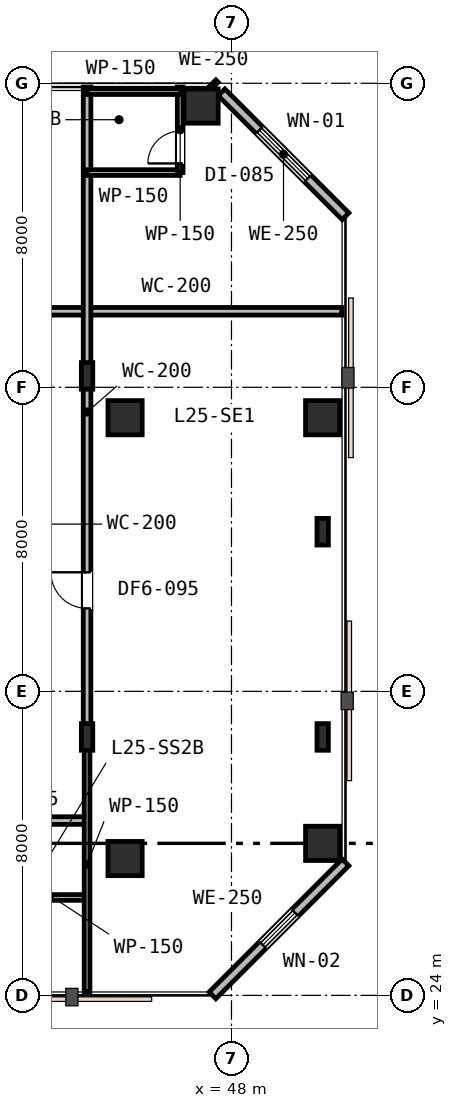
"""IFC4 building model, lengths in metres.
Left out: names, types, materials, properties, quantities, classifications, styles, units other than length and angle.
Written with IfcOpenShell. Run it as: python <this file> out.ifc"""

import sys

from ifc_helpers import new_model, si_unit, direction, frame, frame_2d, origin, origin_2d, place, context, subcontext, project, spatial, rectangle, i_section, extrude, element, fill, save


model = new_model("IFC4")
c1 = context("Model", 3, precision=1e-05, world=origin(), true_north=direction((0.0, 1.0)))
c2 = subcontext(c1, "Body", "Model", "MODEL_VIEW")
j1 = project(units=[si_unit("LENGTHUNIT", "METRE"), si_unit("PLANEANGLEUNIT", "RADIAN")], contexts=[c1])
p1 = place(None, origin())
s1 = spatial("IfcSite", under=j1, at=p1, CompositionType="ELEMENT")
p2 = place(p1, origin())
s2 = spatial("IfcBuilding", under=s1, at=p2, CompositionType="ELEMENT")
p3 = place(p2, frame((0.0, 0.0, 100.8)))
s3 = spatial("IfcBuildingStorey", under=s2, at=p3, CompositionType="ELEMENT", Elevation=100.8)
for number, where, z_axis, x_axis in (
    (1, (45.2, 27.6, 0.0), (0.0, 0.0, 1.0), (1.0, 0.0, 0.0)),
    (2, (45.2, 39.2, 0.0), (0.0, 0.0, 1.0), (1.0, 0.0, 0.0)),
    (3, (47.2, 47.4, 0.0), (0.0, 0.0, 1.0), (1.0, 0.0, 0.0)),
    (4, (50.4, 28.0, 0.0), (0.0, 0.0, 1.0), (1.0, 0.0, 0.0)),
    (5, (50.4, 39.2, 0.0), (0.0, 0.0, 1.0), (1.0, 0.0, 0.0)),
):
    element("IfcColumn", number, at=place(p3, frame(where, z_axis=z_axis, x_axis=x_axis)), inside=s3, PredefinedType="COLUMN", context=c2, shape_type="SweptSolid", body=[
        extrude(rectangle(XDim=0.9, YDim=0.9, at=origin_2d()), origin(), (0.0, 0.0, 1.0), 3.6),
    ])
for number, where, z_axis, x_axis in (
    (6, (44.2, 30.8, 0.0), (0.0, 0.0, 1.0), (1.0, 0.0, 0.0)),
    (7, (44.2, 40.3, 0.0), (0.0, 0.0, 1.0), (1.0, 0.0, 0.0)),
    (8, (50.4, 30.8, 0.0), (0.0, 0.0, 1.0), (1.0, 0.0, 0.0)),
    (9, (50.4, 36.2, 0.0), (0.0, 0.0, 1.0), (1.0, 0.0, 0.0)),
):
    element("IfcColumn", number, at=place(p3, frame(where, z_axis=z_axis, x_axis=x_axis)), inside=s3, PredefinedType="COLUMN", context=c2, shape_type="SweptSolid", body=[
        extrude(i_section(OverallWidth=0.3, OverallDepth=0.7, WebThickness=0.017, FlangeThickness=0.032, FilletRadius=0.027, at=origin_2d()), origin(), (0.0, 0.0, 1.0), 3.6),
    ])
p4 = place(p3, frame((47.5, 24.0, 0.0), z_axis=(0.0, 0.0, 1.0), x_axis=(0.707106781187, 0.707106781187, 0.0)))
e10 = element("IfcWall", 10, at=p4, inside=s3, PredefinedType="STANDARD", context=c2, shape_type="SweptSolid", body=[
    extrude(rectangle(XDim=4.95, YDim=0.25, at=frame_2d((2.475, 0.0))), origin(), (0.0, 0.0, 1.0), 3.33),
])
p5 = place(p4, frame((1.875, 0.0, 0.85)))
e11 = element("IfcOpeningElement", 11, at=p5, cuts=e10, PredefinedType="OPENING", context=c2, shape_type="SweptSolid", body=[
    extrude(rectangle(XDim=1.2, YDim=1.6, at=frame_2d((0.6, 0.8))), frame((0.0, 0.135, 0.0), z_axis=(0.0, -1.0, 0.0), x_axis=(1.0, 0.0, 0.0)), (0.0, 0.0, 1.0), 0.27),
])
p6 = place(p3, frame((51.0, 44.5, 0.0), z_axis=(0.0, 0.0, 1.0), x_axis=(-0.707106781187, 0.707106781187, 0.0)))
e12 = element("IfcWall", 12, at=p6, inside=s3, PredefinedType="STANDARD", context=c2, shape_type="SweptSolid", body=[
    extrude(rectangle(XDim=4.613, YDim=0.25, at=frame_2d((2.306, 0.0))), origin(), (0.0, 0.0, 1.0), 3.33),
])
p7 = place(p6, frame((1.406, 0.0, 0.75)))
e13 = element("IfcOpeningElement", 13, at=p7, cuts=e12, PredefinedType="OPENING", context=c2, shape_type="SweptSolid", body=[
    extrude(rectangle(XDim=1.8, YDim=1.85, at=frame_2d((0.9, 0.925))), frame((0.0, 0.135, 0.0), z_axis=(0.0, -1.0, 0.0), x_axis=(1.0, 0.0, 0.0)), (0.0, 0.0, 1.0), 0.27),
])
p8 = place(p3, frame((47.562, 47.938, 0.0), z_axis=(0.0, 0.0, 1.0), x_axis=(-0.707106781187, 0.707106781187, 0.0)))
e14 = element("IfcWall", 14, at=p8, inside=s3, PredefinedType="STANDARD", context=c2, shape_type="SweptSolid", body=[
    extrude(rectangle(XDim=0.087, YDim=0.25, at=frame_2d((0.044, 0.0))), origin(), (0.0, 0.0, 1.0), 3.33),
])
p9 = place(p3, frame((15.4, 28.6, 0.0), z_axis=(0.0, 0.0, 1.0), x_axis=(1.0, 0.0, 0.0)))
e15 = element("IfcWall", 15, at=p9, inside=s3, PredefinedType="PARTITIONING", context=c2, shape_type="SweptSolid", body=[
    extrude(rectangle(XDim=28.8, YDim=0.2, at=frame_2d((14.4, 0.0))), origin(), (0.0, 0.0, 1.0), 2.87),
])
p10 = place(p9, frame((12.41, 0.0, 0.0)))
e16 = element("IfcOpeningElement", 16, at=p10, cuts=e15, PredefinedType="OPENING", context=c2, shape_type="SweptSolid", body=[
    extrude(rectangle(XDim=0.95, YDim=2.15, at=frame_2d((0.475, 1.075))), frame((0.0, 0.11, 0.0), z_axis=(0.0, -1.0, 0.0), x_axis=(1.0, 0.0, 0.0)), (0.0, 0.0, 1.0), 0.22),
])
p11 = place(p9, frame((22.68, 0.0, 0.0)))
e17 = element("IfcOpeningElement", 17, at=p11, cuts=e15, PredefinedType="OPENING", context=c2, shape_type="SweptSolid", body=[
    extrude(rectangle(XDim=0.95, YDim=2.15, at=frame_2d((0.475, 1.075))), frame((0.0, 0.11, 0.0), z_axis=(0.0, -1.0, 0.0), x_axis=(1.0, 0.0, 0.0)), (0.0, 0.0, 1.0), 0.22),
])
p12 = place(p3, frame((42.2, 42.0, 0.0), z_axis=(0.0, 0.0, 1.0), x_axis=(1.0, 0.0, 0.0)))
e18 = element("IfcWall", 18, at=p12, inside=s3, PredefinedType="PARTITIONING", context=c2, shape_type="SweptSolid", body=[
    extrude(rectangle(XDim=8.7, YDim=0.2, at=frame_2d((4.35, 0.0))), origin(), (0.0, 0.0, 1.0), 3.33),
])
p13 = place(p3, frame((41.75, 26.576, 0.0), z_axis=(0.0, 0.0, 1.0), x_axis=(1.0, 0.0, 0.0)))
e19 = element("IfcWall", 19, at=p13, inside=s3, PredefinedType="PARTITIONING", context=c2, shape_type="SweptSolid", body=[
    extrude(rectangle(XDim=2.45, YDim=0.15, at=frame_2d((1.225, 0.0))), origin(), (0.0, 0.0, 1.0), 3.33),
])
p14 = place(p3, frame((44.2, 30.8, 0.0), z_axis=(0.0, 0.0, 1.0), x_axis=(0.0, -1.0, 0.0)))
e20 = element("IfcWall", 20, at=p14, inside=s3, PredefinedType="PARTITIONING", context=c2, shape_type="SweptSolid", body=[
    extrude(rectangle(XDim=6.7, YDim=0.15, at=frame_2d((3.35, 0.0))), origin(), (0.0, 0.0, 1.0), 2.87),
])
p15 = place(p3, frame((44.2, 30.8, 0.0), z_axis=(0.0, 0.0, 1.0), x_axis=(0.0, 1.0, 0.0)))
e21 = element("IfcWall", 21, at=p15, inside=s3, PredefinedType="PARTITIONING", context=c2, shape_type="SweptSolid", body=[
    extrude(rectangle(XDim=17.1, YDim=0.2, at=frame_2d((8.55, 0.0))), origin(), (0.0, 0.0, 1.0), 2.87),
])
p16 = place(p15, frame((3.382, 0.0, 0.0)))
e22 = element("IfcOpeningElement", 22, at=p16, cuts=e21, PredefinedType="OPENING", context=c2, shape_type="SweptSolid", body=[
    extrude(rectangle(XDim=0.95, YDim=2.15, at=frame_2d((0.475, 1.075))), frame((0.0, 0.11, 0.0), z_axis=(0.0, -1.0, 0.0), x_axis=(1.0, 0.0, 0.0)), (0.0, 0.0, 1.0), 0.22),
])
p17 = place(p3, frame((44.2, 45.65, 0.0), z_axis=(0.0, 0.0, 1.0), x_axis=(1.0, 0.0, 0.0)))
e23 = element("IfcWall", 23, at=p17, inside=s3, PredefinedType="PARTITIONING", context=c2, shape_type="SweptSolid", body=[
    extrude(rectangle(XDim=2.45, YDim=0.15, at=frame_2d((1.225, 0.0))), origin(), (0.0, 0.0, 1.0), 3.33),
])
p18 = place(p3, frame((46.65, 45.65, 0.0), z_axis=(0.0, 0.0, 1.0), x_axis=(0.0, 1.0, 0.0)))
e24 = element("IfcWall", 24, at=p18, inside=s3, PredefinedType="PARTITIONING", context=c2, shape_type="SweptSolid", body=[
    extrude(rectangle(XDim=2.25, YDim=0.15, at=frame_2d((1.125, 0.0))), origin(), (0.0, 0.0, 1.0), 2.96),
])
p19 = place(p18, frame((0.24, 0.0, 0.0)))
e25 = element("IfcOpeningElement", 25, at=p19, cuts=e24, PredefinedType="OPENING", context=c2, shape_type="SweptSolid", body=[
    extrude(rectangle(XDim=0.85, YDim=2.15, at=frame_2d((0.425, 1.075))), frame((0.0, 0.085, 0.0), z_axis=(0.0, -1.0, 0.0), x_axis=(1.0, 0.0, 0.0)), (0.0, 0.0, 1.0), 0.17),
])
p20 = place(p3, frame((44.2, 47.78, 0.0), z_axis=(0.0, 0.0, 1.0), x_axis=(1.0, 0.0, 0.0)))
e26 = element("IfcWall", 26, at=p20, inside=s3, PredefinedType="PARTITIONING", context=c2, shape_type="SweptSolid", body=[
    extrude(rectangle(XDim=2.45, YDim=0.15, at=frame_2d((1.225, 0.0))), origin(), (0.0, 0.0, 1.0), 2.96),
])
p21 = place(p5, origin())
e27 = element("IfcWindow", 27, at=p21, inside=s3, PartitioningType="SINGLE_PANEL", PredefinedType="WINDOW", context=c2, shape_type="SweptSolid", body=[
    extrude(rectangle(XDim=1.2, YDim=1.6, at=frame_2d((0.6, 0.8))), frame((0.0, 0.03, 0.0), z_axis=(0.0, -1.0, 0.0), x_axis=(1.0, 0.0, 0.0)), (0.0, 0.0, 1.0), 0.06),
])
fill(e11, e27)
p22 = place(p7, origin())
e28 = element("IfcWindow", 28, at=p22, inside=s3, PartitioningType="SINGLE_PANEL", PredefinedType="WINDOW", context=c2, shape_type="SweptSolid", body=[
    extrude(rectangle(XDim=1.8, YDim=1.85, at=frame_2d((0.9, 0.925))), frame((0.0, 0.03, 0.0), z_axis=(0.0, -1.0, 0.0), x_axis=(1.0, 0.0, 0.0)), (0.0, 0.0, 1.0), 0.06),
])
fill(e13, e28)
p23 = place(p16, origin())
e29 = element("IfcDoor", 29, at=p23, inside=s3, OperationType="SINGLE_SWING_RIGHT", PredefinedType="DOOR", context=c2, shape_type="SweptSolid", body=[
    extrude(rectangle(XDim=0.95, YDim=2.15, at=frame_2d((0.475, 1.075))), frame((0.0, 0.025, 0.0), z_axis=(0.0, -1.0, 0.0), x_axis=(1.0, 0.0, 0.0)), (0.0, 0.0, 1.0), 0.05),
])
fill(e22, e29)
p24 = place(p19, origin())
e30 = element("IfcDoor", 30, at=p24, inside=s3, OperationType="SINGLE_SWING_LEFT", PredefinedType="DOOR", context=c2, shape_type="SweptSolid", body=[
    extrude(rectangle(XDim=0.85, YDim=2.15, at=frame_2d((0.425, 1.075))), frame((0.0, 0.025, 0.0), z_axis=(0.0, -1.0, 0.0), x_axis=(1.0, 0.0, 0.0)), (0.0, 0.0, 1.0), 0.05),
])
fill(e25, e30)
save(model, sys.argv[1])
